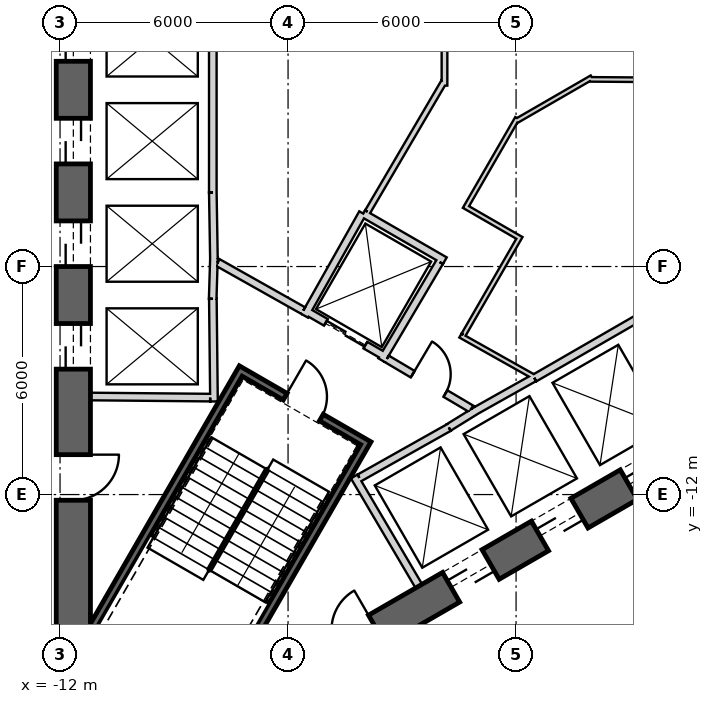
"""IFC4 building model, lengths in metres.
Left out: names, types, materials, properties, quantities, classifications, styles, units other than length and angle.
Written with IfcOpenShell. Run it as: python <this file> out.ifc"""

import sys

from ifc_helpers import new_model, si_unit, direction, frame, frame_2d, origin, place, context, subcontext, project, spatial, rectangle, extrude, element, fill, save


model = new_model("IFC4")
c1 = context("Model", 3, precision=1e-05, world=origin(), true_north=direction((0.0, 1.0)))
c2 = subcontext(c1, "Body", "Model", "MODEL_VIEW")
j1 = project(units=[si_unit("LENGTHUNIT", "METRE"), si_unit("PLANEANGLEUNIT", "RADIAN")], contexts=[c1])
p1 = place(None, origin())
s1 = spatial("IfcSite", under=j1, at=p1, CompositionType="ELEMENT")
p2 = place(p1, origin())
s2 = spatial("IfcBuilding", under=s1, at=p2, CompositionType="ELEMENT")
p3 = place(p2, frame((0.0, 0.0, 57.8)))
s3 = spatial("IfcBuildingStorey", under=s2, at=p3, CompositionType="ELEMENT", Elevation=57.8)
p4 = place(p3, frame((-11.65, 15.762, 0.0), z_axis=(0.0, 0.0, 1.0), x_axis=(0.0, -1.0, 0.0)))
e1 = element("IfcWall", 1, at=p4, inside=s3, PredefinedType="SHEAR", context=c2, shape_type="SweptSolid", body=[
    extrude(rectangle(XDim=31.523, YDim=0.9, at=frame_2d((15.762, 0.0))), origin(), (0.0, 0.0, 1.0), 4.1),
])
p5 = place(p4, frame((7.062, 0.0, 0.0)))
e2 = element("IfcOpeningElement", 2, at=p5, cuts=e1, PredefinedType="OPENING", context=c2, shape_type="SweptSolid", body=[
    extrude(rectangle(XDim=1.2, YDim=2.4, at=frame_2d((0.6, 1.2))), frame((0.0, 0.46, 0.0), z_axis=(0.0, -1.0, 0.0), x_axis=(1.0, 0.0, 0.0)), (0.0, 0.0, 1.0), 0.92),
])
p6 = place(p4, frame((9.762, 0.0, 0.0)))
e3 = element("IfcOpeningElement", 3, at=p6, cuts=e1, PredefinedType="OPENING", context=c2, shape_type="SweptSolid", body=[
    extrude(rectangle(XDim=1.2, YDim=2.4, at=frame_2d((0.6, 1.2))), frame((0.0, 0.46, 0.0), z_axis=(0.0, -1.0, 0.0), x_axis=(1.0, 0.0, 0.0)), (0.0, 0.0, 1.0), 0.92),
])
p7 = place(p4, frame((12.462, 0.0, 0.0)))
e4 = element("IfcOpeningElement", 4, at=p7, cuts=e1, PredefinedType="OPENING", context=c2, shape_type="SweptSolid", body=[
    extrude(rectangle(XDim=1.2, YDim=2.4, at=frame_2d((0.6, 1.2))), frame((0.0, 0.46, 0.0), z_axis=(0.0, -1.0, 0.0), x_axis=(1.0, 0.0, 0.0)), (0.0, 0.0, 1.0), 0.92),
])
p8 = place(p4, frame((15.162, 0.0, 0.0)))
e5 = element("IfcOpeningElement", 5, at=p8, cuts=e1, PredefinedType="OPENING", context=c2, shape_type="SweptSolid", body=[
    extrude(rectangle(XDim=1.2, YDim=2.4, at=frame_2d((0.6, 1.2))), frame((0.0, 0.46, 0.0), z_axis=(0.0, -1.0, 0.0), x_axis=(1.0, 0.0, 0.0)), (0.0, 0.0, 1.0), 0.92),
])
p9 = place(p4, frame((17.862, 0.0, 0.0)))
e6 = element("IfcOpeningElement", 6, at=p9, cuts=e1, PredefinedType="OPENING", context=c2, shape_type="SweptSolid", body=[
    extrude(rectangle(XDim=1.2, YDim=2.4, at=frame_2d((0.6, 1.2))), frame((0.0, 0.46, 0.0), z_axis=(0.0, -1.0, 0.0), x_axis=(1.0, 0.0, 0.0)), (0.0, 0.0, 1.0), 0.92),
])
p10 = place(p4, frame((20.562, 0.0, 0.0)))
e7 = element("IfcOpeningElement", 7, at=p10, cuts=e1, PredefinedType="OPENING", context=c2, shape_type="SweptSolid", body=[
    extrude(rectangle(XDim=1.2, YDim=2.4, at=frame_2d((0.6, 1.2))), frame((0.0, 0.46, 0.0), z_axis=(0.0, -1.0, 0.0), x_axis=(1.0, 0.0, 0.0)), (0.0, 0.0, 1.0), 0.92),
])
p11 = place(p4, frame((23.262, 0.0, 0.0)))
e8 = element("IfcOpeningElement", 8, at=p11, cuts=e1, PredefinedType="OPENING", context=c2, shape_type="SweptSolid", body=[
    extrude(rectangle(XDim=1.2, YDim=2.4, at=frame_2d((0.6, 1.2))), frame((0.0, 0.46, 0.0), z_axis=(0.0, -1.0, 0.0), x_axis=(1.0, 0.0, 0.0)), (0.0, 0.0, 1.0), 0.92),
])
p12 = place(p4, frame((3.612, 0.0, 0.0)))
e9 = element("IfcOpeningElement", 9, at=p12, cuts=e1, PredefinedType="OPENING", context=c2, shape_type="SweptSolid", body=[
    extrude(rectangle(XDim=1.2, YDim=2.4, at=frame_2d((0.6, 1.2))), frame((0.0, 0.46, 0.0), z_axis=(0.0, -1.0, 0.0), x_axis=(1.0, 0.0, 0.0)), (0.0, 0.0, 1.0), 0.92),
])
p13 = place(p4, frame((26.712, 0.0, 0.0)))
e10 = element("IfcOpeningElement", 10, at=p13, cuts=e1, PredefinedType="OPENING", context=c2, shape_type="SweptSolid", body=[
    extrude(rectangle(XDim=1.2, YDim=2.4, at=frame_2d((0.6, 1.2))), frame((0.0, 0.46, 0.0), z_axis=(0.0, -1.0, 0.0), x_axis=(1.0, 0.0, 0.0)), (0.0, 0.0, 1.0), 0.92),
])
p14 = place(p3, frame((-7.825, -17.97, 0.0), z_axis=(0.0, 0.0, 1.0), x_axis=(0.866028369851, 0.499994862586, 0.0)))
e11 = element("IfcWall", 11, at=p14, inside=s3, PredefinedType="SHEAR", context=c2, shape_type="SweptSolid", body=[
    extrude(rectangle(XDim=31.523, YDim=0.9, at=frame_2d((15.762, 0.0))), origin(), (0.0, 0.0, 1.0), 4.1),
])
p15 = place(p14, frame((7.062, 0.0, 0.0)))
e12 = element("IfcOpeningElement", 12, at=p15, cuts=e11, PredefinedType="OPENING", context=c2, shape_type="SweptSolid", body=[
    extrude(rectangle(XDim=1.2, YDim=2.4, at=frame_2d((0.6, 1.2))), frame((0.0, 0.46, 0.0), z_axis=(0.0, -1.0, 0.0), x_axis=(1.0, 0.0, 0.0)), (0.0, 0.0, 1.0), 0.92),
])
p16 = place(p14, frame((9.762, 0.0, 0.0)))
e13 = element("IfcOpeningElement", 13, at=p16, cuts=e11, PredefinedType="OPENING", context=c2, shape_type="SweptSolid", body=[
    extrude(rectangle(XDim=1.2, YDim=2.4, at=frame_2d((0.6, 1.2))), frame((0.0, 0.46, 0.0), z_axis=(0.0, -1.0, 0.0), x_axis=(1.0, 0.0, 0.0)), (0.0, 0.0, 1.0), 0.92),
])
p17 = place(p14, frame((12.462, 0.0, 0.0)))
e14 = element("IfcOpeningElement", 14, at=p17, cuts=e11, PredefinedType="OPENING", context=c2, shape_type="SweptSolid", body=[
    extrude(rectangle(XDim=1.2, YDim=2.4, at=frame_2d((0.6, 1.2))), frame((0.0, 0.46, 0.0), z_axis=(0.0, -1.0, 0.0), x_axis=(1.0, 0.0, 0.0)), (0.0, 0.0, 1.0), 0.92),
])
p18 = place(p14, frame((15.162, 0.0, 0.0)))
e15 = element("IfcOpeningElement", 15, at=p18, cuts=e11, PredefinedType="OPENING", context=c2, shape_type="SweptSolid", body=[
    extrude(rectangle(XDim=1.2, YDim=2.4, at=frame_2d((0.6, 1.2))), frame((0.0, 0.46, 0.0), z_axis=(0.0, -1.0, 0.0), x_axis=(1.0, 0.0, 0.0)), (0.0, 0.0, 1.0), 0.92),
])
p19 = place(p14, frame((17.862, 0.0, 0.0)))
e16 = element("IfcOpeningElement", 16, at=p19, cuts=e11, PredefinedType="OPENING", context=c2, shape_type="SweptSolid", body=[
    extrude(rectangle(XDim=1.2, YDim=2.4, at=frame_2d((0.6, 1.2))), frame((0.0, 0.46, 0.0), z_axis=(0.0, -1.0, 0.0), x_axis=(1.0, 0.0, 0.0)), (0.0, 0.0, 1.0), 0.92),
])
p20 = place(p14, frame((20.562, 0.0, 0.0)))
e17 = element("IfcOpeningElement", 17, at=p20, cuts=e11, PredefinedType="OPENING", context=c2, shape_type="SweptSolid", body=[
    extrude(rectangle(XDim=1.2, YDim=2.4, at=frame_2d((0.6, 1.2))), frame((0.0, 0.46, 0.0), z_axis=(0.0, -1.0, 0.0), x_axis=(1.0, 0.0, 0.0)), (0.0, 0.0, 1.0), 0.92),
])
p21 = place(p14, frame((26.712, 0.0, 0.0)))
e18 = element("IfcOpeningElement", 18, at=p21, cuts=e11, PredefinedType="OPENING", context=c2, shape_type="SweptSolid", body=[
    extrude(rectangle(XDim=1.2, YDim=2.4, at=frame_2d((0.6, 1.2))), frame((0.0, 0.46, 0.0), z_axis=(0.0, -1.0, 0.0), x_axis=(1.0, 0.0, 0.0)), (0.0, 0.0, 1.0), 0.92),
])
p22 = place(p14, frame((3.612, 0.0, 0.0)))
e19 = element("IfcOpeningElement", 19, at=p22, cuts=e11, PredefinedType="OPENING", context=c2, shape_type="SweptSolid", body=[
    extrude(rectangle(XDim=1.2, YDim=2.4, at=frame_2d((0.6, 1.2))), frame((0.0, 0.46, 0.0), z_axis=(0.0, -1.0, 0.0), x_axis=(1.0, 0.0, 0.0)), (0.0, 0.0, 1.0), 0.92),
])
p23 = place(p3, frame((-7.98, 4.05, 0.0), z_axis=(0.0, 0.0, 1.0), x_axis=(0.0, -1.0, 0.0)))
e20 = element("IfcWall", 20, at=p23, inside=s3, PredefinedType="PLUMBINGWALL", context=c2, shape_type="SweptSolid", body=[
    extrude(rectangle(XDim=8.1, YDim=0.2, at=frame_2d((4.05, 0.0))), origin(), (0.0, 0.0, 1.0), 3.8),
])
p24 = place(p3, frame((-7.95, -5.772, 0.0), z_axis=(0.0, 0.0, 1.0), x_axis=(-0.030803413295, -0.999525462272, 0.0)))
e21 = element("IfcWall", 21, at=p24, inside=s3, PredefinedType="PLUMBINGWALL", context=c2, shape_type="SweptSolid", body=[
    extrude(rectangle(XDim=1.078, YDim=0.2, at=frame_2d((0.539, 0.0))), origin(), (0.0, 0.0, 1.0), 3.8),
])
p25 = place(p3, frame((-7.98, -4.05, 0.0), z_axis=(0.0, 0.0, 1.0), x_axis=(0.016809909365, -0.999858703491, 0.0)))
e22 = element("IfcWall", 22, at=p25, inside=s3, PredefinedType="PLUMBINGWALL", context=c2, shape_type="SweptSolid", body=[
    extrude(rectangle(XDim=1.844, YDim=0.2, at=frame_2d((0.922, 0.0))), origin(), (0.0, 0.0, 1.0), 3.8),
])
p26 = place(p3, frame((-7.979, -6.85, 0.0), z_axis=(0.0, 0.0, 1.0), x_axis=(0.011121475088, -0.999938154483, 0.0)))
e23 = element("IfcWall", 23, at=p26, inside=s3, PredefinedType="PLUMBINGWALL", context=c2, shape_type="SweptSolid", body=[
    extrude(rectangle(XDim=2.7, YDim=0.2, at=frame_2d((1.35, 0.0))), origin(), (0.0, 0.0, 1.0), 3.8),
])
p27 = place(p3, frame((-8.05, -9.449, 0.0), z_axis=(0.0, 0.0, 1.0), x_axis=(-0.999957467379, 0.009222983926, 0.0)))
e24 = element("IfcWall", 24, at=p27, inside=s3, PredefinedType="PLUMBINGWALL", context=c2, shape_type="SweptSolid", body=[
    extrude(rectangle(XDim=3.15, YDim=0.2, at=frame_2d((1.575, 0.0))), origin(), (0.0, 0.0, 1.0), 3.8),
])
p28 = place(p3, frame((0.483, -8.936, 0.0), z_axis=(0.0, 0.0, 1.0), x_axis=(0.866030989016, 0.499990325971, 0.0)))
e25 = element("IfcWall", 25, at=p28, inside=s3, PredefinedType="PLUMBINGWALL", context=c2, shape_type="SweptSolid", body=[
    extrude(rectangle(XDim=8.1, YDim=0.2, at=frame_2d((4.05, 0.0))), origin(), (0.0, 0.0, 1.0), 3.8),
])
p29 = place(p3, frame((-2.558, -14.409, 0.0), z_axis=(0.0, 0.0, 1.0), x_axis=(-0.507997497166, 0.861358544901, 0.0)))
e26 = element("IfcWall", 26, at=p29, inside=s3, PredefinedType="PLUMBINGWALL", context=c2, shape_type="SweptSolid", body=[
    extrude(rectangle(XDim=3.35, YDim=0.2, at=frame_2d((1.675, 0.0))), origin(), (0.0, 0.0, 1.0), 3.8),
])
p30 = place(p3, frame((-1.769, -10.237, 0.0), z_axis=(0.0, 0.0, 1.0), x_axis=(-0.871534483978, -0.490334215854, 0.0)))
e27 = element("IfcWall", 27, at=p30, inside=s3, PredefinedType="PLUMBINGWALL", context=c2, shape_type="SweptSolid", body=[
    extrude(rectangle(XDim=2.7, YDim=0.2, at=frame_2d((1.35, 0.0))), origin(), (0.0, 0.0, 1.0), 3.8),
])
p31 = place(p3, frame((-1.024, -9.771, 0.0), z_axis=(0.0, 0.0, 1.0), x_axis=(-0.850348075135, -0.526220629693, 0.0)))
e28 = element("IfcWall", 28, at=p31, inside=s3, PredefinedType="PLUMBINGWALL", context=c2, shape_type="SweptSolid", body=[
    extrude(rectangle(XDim=0.878, YDim=0.2, at=frame_2d((0.439, 0.0))), origin(), (0.0, 0.0, 1.0), 3.8),
])
p32 = place(p3, frame((-1.13, -9.832, 0.0), z_axis=(0.0, 0.0, 1.0), x_axis=(0.871988740738, 0.489525929882, 0.0)))
e29 = element("IfcWall", 29, at=p32, inside=s3, PredefinedType="PLUMBINGWALL", context=c2, shape_type="SweptSolid", body=[
    extrude(rectangle(XDim=1.845, YDim=0.2, at=frame_2d((0.922, 0.0))), origin(), (0.0, 0.0, 1.0), 3.8),
])
p33 = place(p3, frame((-3.905, -10.563, -0.3), z_axis=(0.0, 0.0, 1.0), x_axis=(-0.500012932018, -0.866017937352, 0.0)))
e30 = element("IfcWall", 30, at=p33, inside=s3, PredefinedType="SHEAR", context=c2, shape_type="SweptSolid", body=[
    extrude(rectangle(XDim=8.1, YDim=0.2, at=frame_2d((4.05, 0.0))), origin(), (0.0, 0.0, 1.0), 4.1),
])
p34 = place(p3, frame((-7.196, -8.663, -0.3), z_axis=(0.0, 0.0, 1.0), x_axis=(-0.499997992926, -0.866026562566, 0.0)))
e31 = element("IfcWall", 31, at=p34, inside=s3, PredefinedType="SHEAR", context=c2, shape_type="SweptSolid", body=[
    extrude(rectangle(XDim=7.9, YDim=0.2, at=frame_2d((3.95, 0.0))), origin(), (0.0, 0.0, 1.0), 4.1),
])
p35 = place(p3, frame((-4.041, -10.599, -0.3), z_axis=(0.0, 0.0, 1.0), x_axis=(-0.866047807691, 0.499961193289, 0.0)))
e32 = element("IfcWall", 32, at=p35, inside=s3, PredefinedType="SHEAR", context=c2, shape_type="SweptSolid", body=[
    extrude(rectangle(XDim=3.6, YDim=0.2, at=frame_2d((1.8, 0.0))), origin(), (0.0, 0.0, 1.0), 4.1),
])
p36 = place(p35, frame((1.25, 0.0, 0.3)))
e33 = element("IfcOpeningElement", 33, at=p36, cuts=e32, PredefinedType="OPENING", context=c2, shape_type="SweptSolid", body=[
    extrude(rectangle(XDim=1.1, YDim=2.1, at=frame_2d((0.55, 1.05))), frame((0.0, 0.11, 0.0), z_axis=(0.0, -1.0, 0.0), x_axis=(1.0, 0.0, 0.0)), (0.0, 0.0, 1.0), 0.22),
])
p37 = place(p3, frame((-3.446, -8.368, 0.0), z_axis=(0.0, 0.0, 1.0), x_axis=(-0.866024647952, 0.500001309137, 0.0)))
e34 = element("IfcWall", 34, at=p37, inside=s3, PredefinedType="PLUMBINGWALL", context=c2, shape_type="SweptSolid", body=[
    extrude(rectangle(XDim=2.4, YDim=0.2, at=frame_2d((1.2, 0.0))), origin(), (0.0, 0.0, 1.0), 3.8),
])
p38 = place(p37, frame((0.6, 0.0, 0.0)))
e35 = element("IfcOpeningElement", 35, at=p38, cuts=e34, PredefinedType="OPENING", context=c2, shape_type="SweptSolid", body=[
    extrude(rectangle(XDim=1.2, YDim=2.4, at=frame_2d((0.6, 1.2))), frame((0.0, 0.11, 0.0), z_axis=(0.0, -1.0, 0.0), x_axis=(1.0, 0.0, 0.0)), (0.0, 0.0, 1.0), 0.22),
])
p39 = place(p3, frame((-5.562, -7.296, 0.0), z_axis=(0.0, 0.0, 1.0), x_axis=(0.491322718731, 0.870977603649, 0.0)))
e36 = element("IfcWall", 36, at=p39, inside=s3, PredefinedType="PLUMBINGWALL", context=c2, shape_type="SweptSolid", body=[
    extrude(rectangle(XDim=3.1, YDim=0.2, at=frame_2d((1.55, 0.0))), origin(), (0.0, 0.0, 1.0), 3.8),
])
p40 = place(p3, frame((-4.021, -4.606, 0.0), z_axis=(0.0, 0.0, 1.0), x_axis=(0.866016689309, -0.500015093611, 0.0)))
e37 = element("IfcWall", 37, at=p40, inside=s3, PredefinedType="PLUMBINGWALL", context=c2, shape_type="SweptSolid", body=[
    extrude(rectangle(XDim=2.479, YDim=0.2, at=frame_2d((1.24, 0.0))), origin(), (0.0, 0.0, 1.0), 3.8),
])
p41 = place(p3, frame((-2.012, -5.882, 0.0), z_axis=(0.0, 0.0, 1.0), x_axis=(-0.508619639323, -0.860991325447, 0.0)))
e38 = element("IfcWall", 38, at=p41, inside=s3, PredefinedType="PLUMBINGWALL", context=c2, shape_type="SweptSolid", body=[
    extrude(rectangle(XDim=3.0, YDim=0.2, at=frame_2d((1.5, 0.0))), origin(), (0.0, 0.0, 1.0), 3.8),
])
p42 = place(p3, frame((-7.849, -5.894, 0.0), z_axis=(0.0, 0.0, 1.0), x_axis=(0.871340486379, -0.490678873396, 0.0)))
e39 = element("IfcWall", 39, at=p42, inside=s3, PredefinedType="PARTITIONING", context=c2, shape_type="SweptSolid", body=[
    extrude(rectangle(XDim=2.581, YDim=0.2, at=frame_2d((1.291, 0.0))), origin(), (0.0, 0.0, 1.0), 3.8),
])
p43 = place(p3, frame((-3.401, -8.43, 0.0), z_axis=(0.0, 0.0, 1.0), x_axis=(0.860598681535, -0.509283721849, 0.0)))
e40 = element("IfcWall", 40, at=p43, inside=s3, PredefinedType="PARTITIONING", context=c2, shape_type="SweptSolid", body=[
    extrude(rectangle(XDim=2.581, YDim=0.2, at=frame_2d((1.291, 0.0))), origin(), (0.0, 0.0, 1.0), 3.8),
])
p44 = place(p43, frame((0.791, 0.0, 0.0)))
e41 = element("IfcOpeningElement", 41, at=p44, cuts=e40, PredefinedType="OPENING", context=c2, shape_type="SweptSolid", body=[
    extrude(rectangle(XDim=1.0, YDim=2.1, at=frame_2d((0.5, 1.05))), frame((0.0, 0.11, 0.0), z_axis=(0.0, -1.0, 0.0), x_axis=(1.0, 0.0, 0.0)), (0.0, 0.0, 1.0), 0.22),
])
p45 = place(p3, frame((-1.884, -1.24, 0.0), z_axis=(0.0, 0.0, 1.0), x_axis=(0.0, 1.0, 0.0)))
e42 = element("IfcWall", 42, at=p45, inside=s3, PredefinedType="PLUMBINGWALL", context=c2, shape_type="SweptSolid", body=[
    extrude(rectangle(XDim=2.329, YDim=0.15, at=frame_2d((1.165, 0.0))), origin(), (0.0, 0.0, 1.0), 3.8),
])
p46 = place(p3, frame((-3.906, -4.558, 0.0), z_axis=(0.0, 0.0, 1.0), x_axis=(0.506254243073, 0.862384277089, 0.0)))
e43 = element("IfcWall", 43, at=p46, inside=s3, PredefinedType="PLUMBINGWALL", context=c2, shape_type="SweptSolid", body=[
    extrude(rectangle(XDim=3.971, YDim=0.15, at=frame_2d((1.986, 0.0))), origin(), (0.0, 0.0, 1.0), 3.8),
])
p47 = place(p3, frame((-1.464, -7.816, 0.0), z_axis=(0.0, 0.0, 1.0), x_axis=(0.871880202732, -0.489719217597, 0.0)))
e44 = element("IfcWall", 44, at=p47, inside=s3, PredefinedType="PARTITIONING", context=c2, shape_type="SweptSolid", body=[
    extrude(rectangle(XDim=2.224, YDim=0.12, at=frame_2d((1.112, 0.0))), origin(), (0.0, 0.0, 1.0), 3.8),
])
p48 = place(p3, frame((0.118, -5.195, 0.0), z_axis=(0.0, 0.0, 1.0), x_axis=(-0.499990139034, -0.866031096941, 0.0)))
e45 = element("IfcWall", 45, at=p48, inside=s3, PredefinedType="PARTITIONING", context=c2, shape_type="SweptSolid", body=[
    extrude(rectangle(XDim=3.0, YDim=0.12, at=frame_2d((1.5, 0.0))), origin(), (0.0, 0.0, 1.0), 3.8),
])
p49 = place(p3, frame((-1.371, -4.405, 0.0), z_axis=(0.0, 0.0, 1.0), x_axis=(0.866053003207, -0.499952193351, 0.0)))
e46 = element("IfcWall", 46, at=p49, inside=s3, PredefinedType="PARTITIONING", context=c2, shape_type="SweptSolid", body=[
    extrude(rectangle(XDim=1.625, YDim=0.12, at=frame_2d((0.812, 0.0))), origin(), (0.0, 0.0, 1.0), 3.8),
])
p50 = place(p3, frame((0.03, -2.097, 0.0), z_axis=(0.0, 0.0, 1.0), x_axis=(-0.500000102728, -0.866025344474, 0.0)))
e47 = element("IfcWall", 47, at=p50, inside=s3, PredefinedType="PARTITIONING", context=c2, shape_type="SweptSolid", body=[
    extrude(rectangle(XDim=2.639, YDim=0.12, at=frame_2d((1.319, 0.0))), origin(), (0.0, 0.0, 1.0), 3.8),
])
p51 = place(p3, frame((1.994, -1.024, 0.0), z_axis=(0.0, 0.0, 1.0), x_axis=(-0.866048237946, -0.499960447986, 0.0)))
e48 = element("IfcWall", 48, at=p51, inside=s3, PredefinedType="PARTITIONING", context=c2, shape_type="SweptSolid", body=[
    extrude(rectangle(XDim=2.309, YDim=0.12, at=frame_2d((1.154, 0.0))), origin(), (0.0, 0.0, 1.0), 3.8),
])
p52 = place(p3, frame((5.9, -1.104, 0.0), z_axis=(0.0, 0.0, 1.0), x_axis=(-0.999974192295, 0.007184340221, 0.0)))
e49 = element("IfcWall", 49, at=p52, inside=s3, PredefinedType="PARTITIONING", context=c2, shape_type="SweptSolid", body=[
    extrude(rectangle(XDim=3.976, YDim=0.12, at=frame_2d((1.988, 0.0))), origin(), (0.0, 0.0, 1.0), 3.8),
])
p53 = place(p52, frame((1.588, 0.0, 0.0)))
e50 = element("IfcOpeningElement", 50, at=p53, cuts=e49, PredefinedType="OPENING", context=c2, shape_type="SweptSolid", body=[
    extrude(rectangle(XDim=0.8, YDim=2.1, at=frame_2d((0.4, 1.05))), frame((0.0, 0.07, 0.0), z_axis=(0.0, -1.0, 0.0), x_axis=(1.0, 0.0, 0.0)), (0.0, 0.0, 1.0), 0.14),
])
p54 = place(p3, frame((-6.644, -21.503, 0.0), z_axis=(0.0, 0.0, 1.0), x_axis=(0.866025615729, 0.499999632902, 0.0)))
e51 = element("IfcWall", 51, at=p54, inside=s3, PredefinedType="PARTITIONING", context=c2, shape_type="SweptSolid", body=[
    extrude(rectangle(XDim=32.811, YDim=0.2, at=frame_2d((16.405, 0.0))), origin(), (0.0, 0.0, 1.0), 2.98),
])
p55 = place(p54, frame((24.32, 0.0, 0.0)))
e52 = element("IfcOpeningElement", 52, at=p55, cuts=e51, PredefinedType="OPENING", context=c2, shape_type="SweptSolid", body=[
    extrude(rectangle(XDim=1.0, YDim=2.1, at=frame_2d((0.5, 1.05))), frame((0.0, 0.11, 0.0), z_axis=(0.0, -1.0, 0.0), x_axis=(1.0, 0.0, 0.0)), (0.0, 0.0, 1.0), 0.22),
])
p56 = place(p54, frame((7.965, 0.0, 0.0)))
e53 = element("IfcOpeningElement", 53, at=p56, cuts=e51, PredefinedType="OPENING", context=c2, shape_type="SweptSolid", body=[
    extrude(rectangle(XDim=1.0, YDim=2.1, at=frame_2d((0.5, 1.05))), frame((0.0, 0.11, 0.0), z_axis=(0.0, -1.0, 0.0), x_axis=(1.0, 0.0, 0.0)), (0.0, 0.0, 1.0), 0.22),
])
p57 = place(p36, origin())
e54 = element("IfcDoor", 54, at=p57, inside=s3, OperationType="SINGLE_SWING_RIGHT", PredefinedType="USERDEFINED", context=c2, shape_type="SweptSolid", body=[
    extrude(rectangle(XDim=1.1, YDim=2.1, at=frame_2d((0.55, 1.05))), frame((0.0, 0.025, 0.0), z_axis=(0.0, -1.0, 0.0), x_axis=(1.0, 0.0, 0.0)), (0.0, 0.0, 1.0), 0.05),
])
fill(e33, e54)
p58 = place(p44, origin())
e55 = element("IfcDoor", 55, at=p58, inside=s3, OperationType="SINGLE_SWING_LEFT", PredefinedType="USERDEFINED", context=c2, shape_type="SweptSolid", body=[
    extrude(rectangle(XDim=1.0, YDim=2.1, at=frame_2d((0.5, 1.05))), frame((0.0, 0.025, 0.0), z_axis=(0.0, -1.0, 0.0), x_axis=(1.0, 0.0, 0.0)), (0.0, 0.0, 1.0), 0.05),
])
fill(e41, e55)
p59 = place(p38, origin())
e56 = element("IfcDoor", 56, at=p59, inside=s3, OperationType="SLIDING_TO_LEFT", PredefinedType="USERDEFINED", context=c2, shape_type="SweptSolid", body=[
    extrude(rectangle(XDim=1.2, YDim=2.4, at=frame_2d((0.6, 1.2))), frame((0.0, 0.025, 0.0), z_axis=(0.0, -1.0, 0.0), x_axis=(1.0, 0.0, 0.0)), (0.0, 0.0, 1.0), 0.05),
])
fill(e35, e56)
p60 = place(p8, origin())
e57 = element("IfcDoor", 57, at=p60, inside=s3, OperationType="SLIDING_TO_LEFT", PredefinedType="USERDEFINED", context=c2, shape_type="SweptSolid", body=[
    extrude(rectangle(XDim=1.2, YDim=2.4, at=frame_2d((0.6, 1.2))), frame((0.0, 0.025, 0.0), z_axis=(0.0, -1.0, 0.0), x_axis=(1.0, 0.0, 0.0)), (0.0, 0.0, 1.0), 0.05),
])
fill(e5, e57)
p61 = place(p9, origin())
e58 = element("IfcDoor", 58, at=p61, inside=s3, OperationType="SLIDING_TO_LEFT", PredefinedType="USERDEFINED", context=c2, shape_type="SweptSolid", body=[
    extrude(rectangle(XDim=1.2, YDim=2.4, at=frame_2d((0.6, 1.2))), frame((0.0, 0.025, 0.0), z_axis=(0.0, -1.0, 0.0), x_axis=(1.0, 0.0, 0.0)), (0.0, 0.0, 1.0), 0.05),
])
fill(e6, e58)
p62 = place(p10, origin())
e59 = element("IfcDoor", 59, at=p62, inside=s3, OperationType="SLIDING_TO_LEFT", PredefinedType="USERDEFINED", context=c2, shape_type="SweptSolid", body=[
    extrude(rectangle(XDim=1.2, YDim=2.4, at=frame_2d((0.6, 1.2))), frame((0.0, 0.025, 0.0), z_axis=(0.0, -1.0, 0.0), x_axis=(1.0, 0.0, 0.0)), (0.0, 0.0, 1.0), 0.05),
])
fill(e7, e59)
p63 = place(p11, origin())
e60 = element("IfcDoor", 60, at=p63, inside=s3, OperationType="SLIDING_TO_LEFT", PredefinedType="USERDEFINED", context=c2, shape_type="SweptSolid", body=[
    extrude(rectangle(XDim=1.2, YDim=2.4, at=frame_2d((0.6, 1.2))), frame((0.0, 0.025, 0.0), z_axis=(0.0, -1.0, 0.0), x_axis=(1.0, 0.0, 0.0)), (0.0, 0.0, 1.0), 0.05),
])
fill(e8, e60)
p64 = place(p15, origin())
e61 = element("IfcDoor", 61, at=p64, inside=s3, OperationType="SLIDING_TO_LEFT", PredefinedType="USERDEFINED", context=c2, shape_type="SweptSolid", body=[
    extrude(rectangle(XDim=1.2, YDim=2.4, at=frame_2d((0.6, 1.2))), frame((0.0, 0.025, 0.0), z_axis=(0.0, -1.0, 0.0), x_axis=(1.0, 0.0, 0.0)), (0.0, 0.0, 1.0), 0.05),
])
fill(e12, e61)
p65 = place(p16, origin())
e62 = element("IfcDoor", 62, at=p65, inside=s3, OperationType="SLIDING_TO_LEFT", PredefinedType="USERDEFINED", context=c2, shape_type="SweptSolid", body=[
    extrude(rectangle(XDim=1.2, YDim=2.4, at=frame_2d((0.6, 1.2))), frame((0.0, 0.025, 0.0), z_axis=(0.0, -1.0, 0.0), x_axis=(1.0, 0.0, 0.0)), (0.0, 0.0, 1.0), 0.05),
])
fill(e13, e62)
p66 = place(p17, origin())
e63 = element("IfcDoor", 63, at=p66, inside=s3, OperationType="SLIDING_TO_LEFT", PredefinedType="USERDEFINED", context=c2, shape_type="SweptSolid", body=[
    extrude(rectangle(XDim=1.2, YDim=2.4, at=frame_2d((0.6, 1.2))), frame((0.0, 0.025, 0.0), z_axis=(0.0, -1.0, 0.0), x_axis=(1.0, 0.0, 0.0)), (0.0, 0.0, 1.0), 0.05),
])
fill(e14, e63)
p67 = place(p13, origin())
e64 = element("IfcDoor", 64, at=p67, inside=s3, OperationType="SINGLE_SWING_LEFT", PredefinedType="USERDEFINED", context=c2, shape_type="SweptSolid", body=[
    extrude(rectangle(XDim=1.2, YDim=2.4, at=frame_2d((0.6, 1.2))), frame((0.0, 0.025, 0.0), z_axis=(0.0, -1.0, 0.0), x_axis=(1.0, 0.0, 0.0)), (0.0, 0.0, 1.0), 0.05),
])
fill(e10, e64)
save(model, sys.argv[1])
